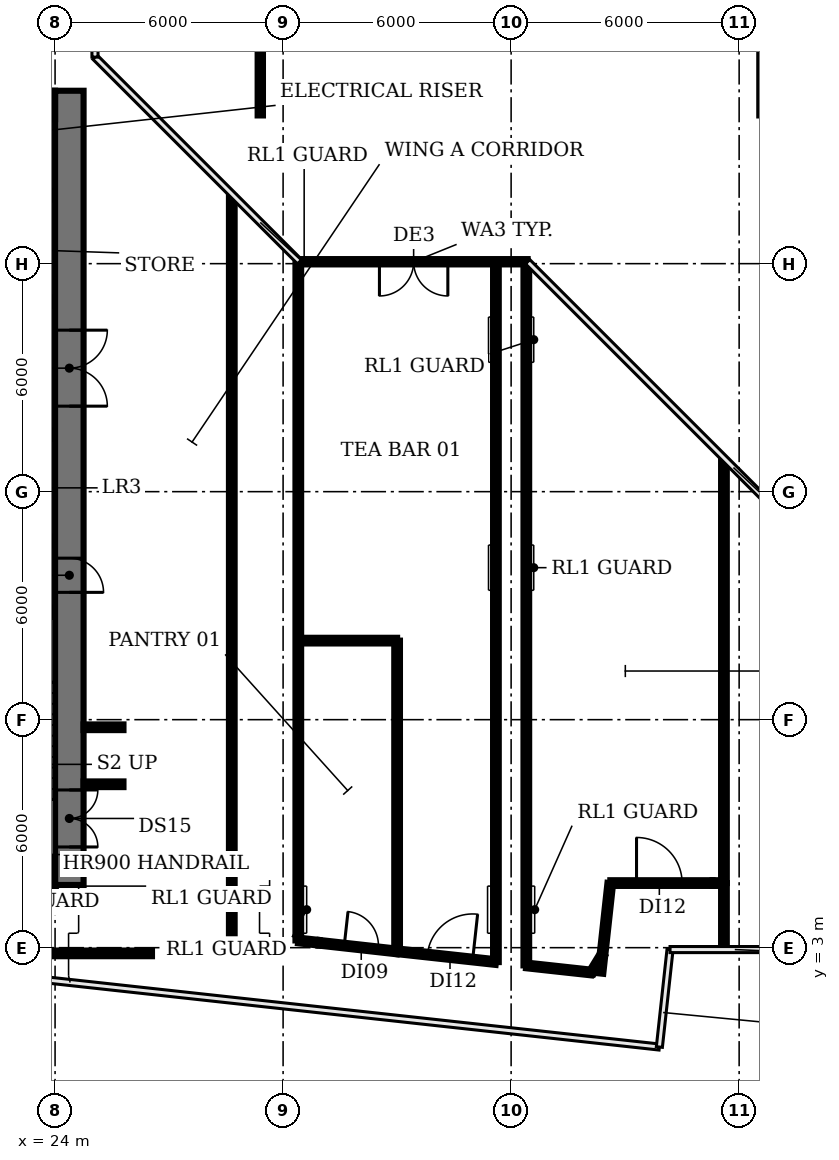
"""IFC4 building model, lengths in metres.
Left out: names, types, materials, properties, quantities, classifications, styles, units other than length and angle.
Written with IfcOpenShell. Run it as: python <this file> out.ifc"""

import sys

from ifc_helpers import new_model, si_unit, direction, frame, frame_2d, origin, place, context, subcontext, project, spatial, rectangle, extrude, element, fill, save


model = new_model("IFC4")
c1 = context("Model", 3, precision=1e-05, world=origin(), true_north=direction((0.0, 1.0)))
c2 = subcontext(c1, "Body", "Model", "MODEL_VIEW")
j1 = project(units=[si_unit("LENGTHUNIT", "METRE"), si_unit("PLANEANGLEUNIT", "RADIAN")], contexts=[c1])
p1 = place(None, origin())
s1 = spatial("IfcSite", under=j1, at=p1, CompositionType="ELEMENT")
p2 = place(p1, origin())
s2 = spatial("IfcBuilding", under=s1, at=p2, CompositionType="ELEMENT")
p3 = place(p2, frame((0.0, 0.0, 138.2)))
s3 = spatial("IfcBuildingStorey", under=s2, at=p3, CompositionType="ELEMENT", Elevation=138.2)
p4 = place(p3, frame((36.435, 21.05, 0.0), z_axis=(0.0, 0.0, 1.0), x_axis=(-1.0, 0.0, 0.0)))
e1 = element("IfcWall", 1, at=p4, inside=s3, PredefinedType="SOLIDWALL", context=c2, shape_type="SweptSolid", body=[
    extrude(rectangle(XDim=6.0, YDim=0.14, at=frame_2d((3.0, 0.0))), origin(), (0.0, 0.0, 1.0), 8.05),
])
p5 = place(p4, frame((2.1, 0.0, 0.0)))
e2 = element("IfcOpeningElement", 2, at=p5, cuts=e1, PredefinedType="OPENING", context=c2, shape_type="SweptSolid", body=[
    extrude(rectangle(XDim=1.8, YDim=2.4, at=frame_2d((0.9, 1.2))), frame((0.0, 0.08, 0.0), z_axis=(0.0, -1.0, 0.0), x_axis=(1.0, 0.0, 0.0)), (0.0, 0.0, 1.0), 0.16),
])
p6 = place(p3, frame((29.4, 24.9, 0.0), z_axis=(0.0, 0.0, 1.0), x_axis=(0.0, 1.0, 0.0)))
e3 = element("IfcWall", 3, at=p6, inside=s3, PredefinedType="SOLIDWALL", context=c2, shape_type="SweptSolid", body=[
    extrude(rectangle(XDim=3.7, YDim=0.14, at=frame_2d((1.85, 0.0))), origin(), (0.0, 0.0, 1.0), 8.05),
])
p7 = place(p3, frame((20.85, 11.825, 0.0), z_axis=(0.0, 0.0, 1.0), x_axis=(1.0, 0.0, 0.0)))
e4 = element("IfcWall", 4, at=p7, inside=s3, PredefinedType="SHEAR", context=c2, shape_type="SweptSolid", body=[
    extrude(rectangle(XDim=3.15, YDim=0.25, at=frame_2d((1.575, 0.0))), origin(), (0.0, 0.0, 1.0), 8.05),
])
p8 = place(p3, frame((16.6, 13.7, 0.0), z_axis=(0.0, 0.0, 1.0), x_axis=(1.0, 0.0, 0.0)))
e5 = element("IfcWall", 5, at=p8, inside=s3, PredefinedType="PARTITIONING", context=c2, shape_type="SweptSolid", body=[
    extrude(rectangle(XDim=7.4, YDim=0.225, at=frame_2d((3.7, 0.0))), origin(), (0.0, 0.0, 1.0), 8.05),
])
p9 = place(p3, frame((9.4, 16.5, 0.0), z_axis=(0.0, 0.0, 1.0), x_axis=(1.0, 0.0, 0.0)))
e6 = element("IfcWall", 6, at=p9, inside=s3, PredefinedType="PARTITIONING", context=c2, shape_type="SweptSolid", body=[
    extrude(rectangle(XDim=14.6, YDim=0.225, at=frame_2d((7.3, 0.0))), origin(), (0.0, 0.0, 1.0), 8.05),
])
p10 = place(p9, frame((0.75, 0.0, 0.0)))
e7 = element("IfcOpeningElement", 7, at=p10, cuts=e6, PredefinedType="OPENING", context=c2, shape_type="SweptSolid", body=[
    extrude(rectangle(XDim=1.1, YDim=2.1, at=frame_2d((0.55, 1.05))), frame((0.0, 0.123, 0.0), z_axis=(0.0, -1.0, 0.0), x_axis=(1.0, 0.0, 0.0)), (0.0, 0.0, 1.0), 0.245),
])
p11 = place(p9, frame((3.55, 0.0, 0.0)))
e8 = element("IfcOpeningElement", 8, at=p11, cuts=e6, PredefinedType="OPENING", context=c2, shape_type="SweptSolid", body=[
    extrude(rectangle(XDim=1.1, YDim=2.1, at=frame_2d((0.55, 1.05))), frame((0.0, 0.123, 0.0), z_axis=(0.0, -1.0, 0.0), x_axis=(1.0, 0.0, 0.0)), (0.0, 0.0, 1.0), 0.245),
])
p12 = place(p9, frame((6.35, 0.0, 0.0)))
e9 = element("IfcOpeningElement", 9, at=p12, cuts=e6, PredefinedType="OPENING", context=c2, shape_type="SweptSolid", body=[
    extrude(rectangle(XDim=1.1, YDim=2.1, at=frame_2d((0.55, 1.05))), frame((0.0, 0.123, 0.0), z_axis=(0.0, -1.0, 0.0), x_axis=(1.0, 0.0, 0.0)), (0.0, 0.0, 1.0), 0.245),
])
p13 = place(p9, frame((9.15, 0.0, 0.0)))
e10 = element("IfcOpeningElement", 10, at=p13, cuts=e6, PredefinedType="OPENING", context=c2, shape_type="SweptSolid", body=[
    extrude(rectangle(XDim=1.1, YDim=2.1, at=frame_2d((0.55, 1.05))), frame((0.0, 0.123, 0.0), z_axis=(0.0, -1.0, 0.0), x_axis=(1.0, 0.0, 0.0)), (0.0, 0.0, 1.0), 0.245),
])
p14 = place(p9, frame((12.4, 0.0, 0.0)))
e11 = element("IfcOpeningElement", 11, at=p14, cuts=e6, PredefinedType="OPENING", context=c2, shape_type="SweptSolid", body=[
    extrude(rectangle(XDim=1.0, YDim=2.1, at=frame_2d((0.5, 1.05))), frame((0.0, 0.123, 0.0), z_axis=(0.0, -1.0, 0.0), x_axis=(1.0, 0.0, 0.0)), (0.0, 0.0, 1.0), 0.245),
])
p15 = place(p3, frame((24.0, 20.0, 0.0), z_axis=(0.0, 0.0, 1.0), x_axis=(-1.0, 0.0, 0.0)))
e12 = element("IfcWall", 12, at=p15, inside=s3, PredefinedType="PARTITIONING", context=c2, shape_type="SweptSolid", body=[
    extrude(rectangle(XDim=14.6, YDim=0.225, at=frame_2d((7.3, 0.0))), origin(), (0.0, 0.0, 1.0), 8.05),
])
p16 = place(p15, frame((12.75, 0.0, 0.0)))
e13 = element("IfcOpeningElement", 13, at=p16, cuts=e12, PredefinedType="OPENING", context=c2, shape_type="SweptSolid", body=[
    extrude(rectangle(XDim=1.1, YDim=2.1, at=frame_2d((0.55, 1.05))), frame((0.0, 0.123, 0.0), z_axis=(0.0, -1.0, 0.0), x_axis=(1.0, 0.0, 0.0)), (0.0, 0.0, 1.0), 0.245),
])
p17 = place(p15, frame((9.95, 0.0, 0.0)))
e14 = element("IfcOpeningElement", 14, at=p17, cuts=e12, PredefinedType="OPENING", context=c2, shape_type="SweptSolid", body=[
    extrude(rectangle(XDim=1.1, YDim=2.1, at=frame_2d((0.55, 1.05))), frame((0.0, 0.123, 0.0), z_axis=(0.0, -1.0, 0.0), x_axis=(1.0, 0.0, 0.0)), (0.0, 0.0, 1.0), 0.245),
])
p18 = place(p15, frame((7.15, 0.0, 0.0)))
e15 = element("IfcOpeningElement", 15, at=p18, cuts=e12, PredefinedType="OPENING", context=c2, shape_type="SweptSolid", body=[
    extrude(rectangle(XDim=1.1, YDim=2.1, at=frame_2d((0.55, 1.05))), frame((0.0, 0.123, 0.0), z_axis=(0.0, -1.0, 0.0), x_axis=(1.0, 0.0, 0.0)), (0.0, 0.0, 1.0), 0.245),
])
p19 = place(p15, frame((4.35, 0.0, 0.0)))
e16 = element("IfcOpeningElement", 16, at=p19, cuts=e12, PredefinedType="OPENING", context=c2, shape_type="SweptSolid", body=[
    extrude(rectangle(XDim=1.1, YDim=2.1, at=frame_2d((0.55, 1.05))), frame((0.0, 0.123, 0.0), z_axis=(0.0, -1.0, 0.0), x_axis=(1.0, 0.0, 0.0)), (0.0, 0.0, 1.0), 0.245),
])
p20 = place(p15, frame((1.2, 0.0, 0.0)))
e17 = element("IfcOpeningElement", 17, at=p20, cuts=e12, PredefinedType="OPENING", context=c2, shape_type="SweptSolid", body=[
    extrude(rectangle(XDim=1.0, YDim=2.1, at=frame_2d((0.5, 1.05))), frame((0.0, 0.123, 0.0), z_axis=(0.0, -1.0, 0.0), x_axis=(1.0, 0.0, 0.0)), (0.0, 0.0, 1.0), 0.245),
])
p21 = place(p3, frame((9.4, 22.8, 0.0), z_axis=(0.0, 0.0, 1.0), x_axis=(1.0, 0.0, 0.0)))
e18 = element("IfcWall", 18, at=p21, inside=s3, PredefinedType="PARTITIONING", context=c2, shape_type="SweptSolid", body=[
    extrude(rectangle(XDim=14.6, YDim=0.225, at=frame_2d((7.3, 0.0))), origin(), (0.0, 0.0, 1.0), 8.05),
])
p22 = place(p3, frame((24.375, 25.55, 0.0), z_axis=(0.0, 0.0, 1.0), x_axis=(0.0, -1.0, 0.0)))
e19 = element("IfcWall", 19, at=p22, inside=s3, PredefinedType="SHEAR", context=c2, shape_type="SweptSolid", body=[
    extrude(rectangle(XDim=20.9, YDim=0.75, at=frame_2d((10.45, 0.0))), origin(), (0.0, 0.0, 1.0), 8.05),
])
p23 = place(p22, frame((18.4, 0.0, 0.0)))
e20 = element("IfcOpeningElement", 20, at=p23, cuts=e19, PredefinedType="OPENING", context=c2, shape_type="SweptSolid", body=[
    extrude(rectangle(XDim=1.5, YDim=2.1, at=frame_2d((0.75, 1.05))), frame((0.0, 0.385, 0.0), z_axis=(0.0, -1.0, 0.0), x_axis=(1.0, 0.0, 0.0)), (0.0, 0.0, 1.0), 0.77),
])
p24 = place(p22, frame((12.3, 0.0, 0.0)))
e21 = element("IfcOpeningElement", 21, at=p24, cuts=e19, PredefinedType="OPENING", context=c2, shape_type="SweptSolid", body=[
    extrude(rectangle(XDim=0.9, YDim=2.1, at=frame_2d((0.45, 1.05))), frame((0.0, 0.385, 0.0), z_axis=(0.0, -1.0, 0.0), x_axis=(1.0, 0.0, 0.0)), (0.0, 0.0, 1.0), 0.77),
])
p25 = place(p22, frame((6.3, 0.0, 0.0)))
e22 = element("IfcOpeningElement", 22, at=p25, cuts=e19, PredefinedType="OPENING", context=c2, shape_type="SweptSolid", body=[
    extrude(rectangle(XDim=2.0, YDim=2.1, at=frame_2d((1.0, 1.05))), frame((0.0, 0.385, 0.0), z_axis=(0.0, -1.0, 0.0), x_axis=(1.0, 0.0, 0.0)), (0.0, 0.0, 1.0), 0.77),
])
p26 = place(p3, frame((24.0, 5.025, 0.0), z_axis=(0.0, 0.0, 1.0), x_axis=(-1.0, 0.0, 0.0)))
e23 = element("IfcWall", 23, at=p26, inside=s3, PredefinedType="SHEAR", context=c2, shape_type="SweptSolid", body=[
    extrude(rectangle(XDim=18.0, YDim=0.75, at=frame_2d((9.0, 0.0))), origin(), (0.0, 0.0, 1.0), 8.05),
])
p27 = place(p26, frame((13.0, 0.0, 0.0)))
e24 = element("IfcOpeningElement", 24, at=p27, cuts=e23, PredefinedType="OPENING", context=c2, shape_type="SweptSolid", body=[
    extrude(rectangle(XDim=1.2, YDim=2.1, at=frame_2d((0.6, 1.05))), frame((0.0, 0.385, 0.0), z_axis=(0.0, -1.0, 0.0), x_axis=(1.0, 0.0, 0.0)), (0.0, 0.0, 1.0), 0.77),
])
p28 = place(p26, frame((3.85, 0.0, 0.0)))
e25 = element("IfcOpeningElement", 25, at=p28, cuts=e23, PredefinedType="OPENING", context=c2, shape_type="SweptSolid", body=[
    extrude(rectangle(XDim=1.0, YDim=2.1, at=frame_2d((0.5, 1.05))), frame((0.0, 0.385, 0.0), z_axis=(0.0, -1.0, 0.0), x_axis=(1.0, 0.0, 0.0)), (0.0, 0.0, 1.0), 0.77),
])
p29 = place(p3, frame((6.0, 25.175, 0.0), z_axis=(0.0, 0.0, 1.0), x_axis=(1.0, 0.0, 0.0)))
e26 = element("IfcWall", 26, at=p29, inside=s3, PredefinedType="SHEAR", context=c2, shape_type="SweptSolid", body=[
    extrude(rectangle(XDim=18.0, YDim=0.75, at=frame_2d((9.0, 0.0))), origin(), (0.0, 0.0, 1.0), 8.05),
])
p30 = place(p3, frame((17.949, 2.85, 0.0), z_axis=(0.0, 0.0, 1.0), x_axis=(1.0, 0.0, 0.0)))
e27 = element("IfcWall", 27, at=p30, inside=s3, PredefinedType="PARTITIONING", context=c2, shape_type="SweptSolid", body=[
    extrude(rectangle(XDim=8.601, YDim=0.15, at=frame_2d((4.301, 0.0))), origin(), (0.0, 0.0, 1.0), 6.33),
])
for number, where, z_axis, x_axis in (
    (28, (24.75, 7.3, 0.0), (0.0, 0.0, 1.0), (1.0, 0.0, 0.0)),
    (29, (24.75, 8.8, 0.0), (0.0, 0.0, 1.0), (1.0, 0.0, 0.0)),
):
    element("IfcWall", number, at=place(p3, frame(where, z_axis=z_axis, x_axis=x_axis)), inside=s3, PredefinedType="PARTITIONING", context=c2, shape_type="SweptSolid", body=[
        extrude(rectangle(XDim=1.05, YDim=0.15, at=frame_2d((0.525, 0.0))), origin(), (0.0, 0.0, 1.0), 6.33),
    ])
p31 = place(p3, frame((28.65, 3.38, 0.0), z_axis=(0.0, 0.0, 1.0), x_axis=(0.0, 1.0, 0.0)))
e30 = element("IfcWall", 30, at=p31, inside=s3, PredefinedType="PARTITIONING", context=c2, shape_type="SweptSolid", body=[
    extrude(rectangle(XDim=19.38, YDim=0.15, at=frame_2d((9.69, 0.0))), origin(), (0.0, 0.0, 1.0), 6.33),
])
p32 = place(p3, frame((30.4, 3.19, 0.0), z_axis=(0.0, 0.0, 1.0), x_axis=(0.0, 1.0, 0.0)))
e31 = element("IfcWall", 31, at=p32, inside=s3, PredefinedType="PARTITIONING", context=c2, shape_type="SweptSolid", body=[
    extrude(rectangle(XDim=17.796, YDim=0.15, at=frame_2d((8.898, 0.0))), origin(), (0.0, 0.0, 1.0), 6.33),
])
p33 = place(p3, frame((30.4, 3.19, 0.0), z_axis=(0.0, 0.0, 1.0), x_axis=(0.993845851809, -0.110771940683, 0.0)))
e32 = element("IfcWall", 32, at=p33, inside=s3, PredefinedType="PARTITIONING", context=c2, shape_type="SweptSolid", body=[
    extrude(rectangle(XDim=0.551, YDim=0.15, at=frame_2d((0.275, 0.0))), origin(), (0.0, 0.0, 1.0), 6.33),
])
p34 = place(p3, frame((30.4, 11.08, 0.0), z_axis=(0.0, 0.0, 1.0), x_axis=(1.0, 0.0, 0.0)))
e33 = element("IfcWall", 33, at=p34, inside=s3, PredefinedType="PARTITIONING", context=c2, shape_type="SweptSolid", body=[
    extrude(rectangle(XDim=2.6, YDim=0.15, at=frame_2d((1.3, 0.0))), origin(), (0.0, 0.0, 1.0), 6.33),
])
p35 = place(p3, frame((30.948, 3.129, 0.0), z_axis=(0.0, 0.0, 1.0), x_axis=(0.993833173322, -0.110885632993, 0.0)))
e34 = element("IfcWall", 34, at=p35, inside=s3, PredefinedType="PARTITIONING", context=c2, shape_type="SweptSolid", body=[
    extrude(rectangle(XDim=2.065, YDim=0.15, at=frame_2d((1.033, 0.0))), origin(), (0.0, 0.0, 1.0), 6.33),
])
p36 = place(p35, frame((0.665, 0.0, 0.0)))
e35 = element("IfcOpeningElement", 35, at=p36, cuts=e34, PredefinedType="OPENING", context=c2, shape_type="SweptSolid", body=[
    extrude(rectangle(XDim=0.9, YDim=2.1, at=frame_2d((0.45, 1.05))), frame((0.0, 0.085, 0.0), z_axis=(0.0, -1.0, 0.0), x_axis=(1.0, 0.0, 0.0)), (0.0, 0.0, 1.0), 0.17),
])
p37 = place(p3, frame((33.0, 2.905, 0.0), z_axis=(0.0, 0.0, 1.0), x_axis=(0.0, 1.0, 0.0)))
e36 = element("IfcWall", 36, at=p37, inside=s3, PredefinedType="PARTITIONING", context=c2, shape_type="SweptSolid", body=[
    extrude(rectangle(XDim=8.176, YDim=0.15, at=frame_2d((4.088, 0.0))), origin(), (0.0, 0.0, 1.0), 6.33),
])
p38 = place(p3, frame((33.0, 2.905, 0.0), z_axis=(0.0, 0.0, 1.0), x_axis=(0.994090278012, -0.108556525195, 0.0)))
e37 = element("IfcWall", 37, at=p38, inside=s3, PredefinedType="PARTITIONING", context=c2, shape_type="SweptSolid", body=[
    extrude(rectangle(XDim=2.615, YDim=0.15, at=frame_2d((1.308, 0.0))), origin(), (0.0, 0.0, 1.0), 6.33),
])
p39 = place(p38, frame((0.8, 0.0, 0.0)))
e38 = element("IfcOpeningElement", 38, at=p39, cuts=e37, PredefinedType="OPENING", context=c2, shape_type="SweptSolid", body=[
    extrude(rectangle(XDim=1.2, YDim=2.1, at=frame_2d((0.6, 1.05))), frame((0.0, 0.085, 0.0), z_axis=(0.0, -1.0, 0.0), x_axis=(1.0, 0.0, 0.0)), (0.0, 0.0, 1.0), 0.17),
])
p40 = place(p3, frame((35.6, 2.621, 0.0), z_axis=(0.0, 0.0, 1.0), x_axis=(0.0, 1.0, 0.0)))
e39 = element("IfcWall", 39, at=p40, inside=s3, PredefinedType="PARTITIONING", context=c2, shape_type="SweptSolid", body=[
    extrude(rectangle(XDim=18.379, YDim=0.15, at=frame_2d((9.19, 0.0))), origin(), (0.0, 0.0, 1.0), 6.33),
])
p41 = place(p3, frame((36.4, 2.533, 0.0), z_axis=(0.0, 0.0, 1.0), x_axis=(0.0, 1.0, 0.0)))
e40 = element("IfcWall", 40, at=p41, inside=s3, PredefinedType="PARTITIONING", context=c2, shape_type="SweptSolid", body=[
    extrude(rectangle(XDim=18.411, YDim=0.15, at=frame_2d((9.205, 0.0))), origin(), (0.0, 0.0, 1.0), 6.33),
])
p42 = place(p3, frame((36.4, 2.533, 0.0), z_axis=(0.0, 0.0, 1.0), x_axis=(0.99406714658, -0.108768139133, 0.0)))
e41 = element("IfcWall", 41, at=p42, inside=s3, PredefinedType="PARTITIONING", context=c2, shape_type="SweptSolid", body=[
    extrude(rectangle(XDim=1.724, YDim=0.15, at=frame_2d((0.862, 0.0))), origin(), (0.0, 0.0, 1.0), 6.33),
])
p43 = place(p3, frame((38.114, 2.346, 0.0), z_axis=(0.0, 0.0, 1.0), x_axis=(0.522069410568, 0.852903001841, 0.0)))
e42 = element("IfcWall", 42, at=p43, inside=s3, PredefinedType="PARTITIONING", context=c2, shape_type="SweptSolid", body=[
    extrude(rectangle(XDim=0.558, YDim=0.15, at=frame_2d((0.279, 0.0))), origin(), (0.0, 0.0, 1.0), 6.33),
])
p44 = place(p3, frame((38.35, 2.32, 0.0), z_axis=(0.0, 0.0, 1.0), x_axis=(0.108606922801, 0.994084773206, 0.0)))
e43 = element("IfcWall", 43, at=p44, inside=s3, PredefinedType="PARTITIONING", context=c2, shape_type="SweptSolid", body=[
    extrude(rectangle(XDim=2.394, YDim=0.15, at=frame_2d((1.197, 0.0))), origin(), (0.0, 0.0, 1.0), 6.33),
])
p45 = place(p3, frame((38.61, 4.7, 0.0), z_axis=(0.0, 0.0, 1.0), x_axis=(1.0, 0.0, 0.0)))
e44 = element("IfcWall", 44, at=p45, inside=s3, PredefinedType="PARTITIONING", context=c2, shape_type="SweptSolid", body=[
    extrude(rectangle(XDim=2.69, YDim=0.15, at=frame_2d((1.345, 0.0))), origin(), (0.0, 0.0, 1.0), 6.33),
])
p46 = place(p45, frame((0.69, 0.0, 0.0)))
e45 = element("IfcOpeningElement", 45, at=p46, cuts=e44, PredefinedType="OPENING", context=c2, shape_type="SweptSolid", body=[
    extrude(rectangle(XDim=1.2, YDim=2.1, at=frame_2d((0.6, 1.05))), frame((0.0, 0.085, 0.0), z_axis=(0.0, -1.0, 0.0), x_axis=(1.0, 0.0, 0.0)), (0.0, 0.0, 1.0), 0.17),
])
p47 = place(p3, frame((41.3, 4.7, 0.0), z_axis=(0.0, 0.0, 1.0), x_axis=(1.0, 0.0, 0.0)))
e46 = element("IfcWall", 46, at=p47, inside=s3, PredefinedType="PARTITIONING", context=c2, shape_type="SweptSolid", body=[
    extrude(rectangle(XDim=0.3, YDim=0.15, at=frame_2d((0.15, 0.0))), origin(), (0.0, 0.0, 1.0), 6.33),
])
p48 = place(p3, frame((41.6, 3.0, 0.0), z_axis=(0.0, 0.0, 1.0), x_axis=(0.0, 1.0, 0.0)))
e47 = element("IfcWall", 47, at=p48, inside=s3, PredefinedType="PARTITIONING", context=c2, shape_type="SweptSolid", body=[
    extrude(rectangle(XDim=1.7, YDim=0.15, at=frame_2d((0.85, 0.0))), origin(), (0.0, 0.0, 1.0), 6.33),
])
p49 = place(p3, frame((41.6, 4.7, 0.0), z_axis=(0.0, 0.0, 1.0), x_axis=(0.0, 1.0, 0.0)))
e48 = element("IfcWall", 48, at=p49, inside=s3, PredefinedType="PARTITIONING", context=c2, shape_type="SweptSolid", body=[
    extrude(rectangle(XDim=11.11, YDim=0.15, at=frame_2d((5.555, 0.0))), origin(), (0.0, 0.0, 1.0), 6.33),
])
p50 = place(p5, origin())
e49 = element("IfcDoor", 49, at=p50, inside=s3, OperationType="DOUBLE_DOOR_DOUBLE_SWING", PredefinedType="DOOR", context=c2, shape_type="SweptSolid", body=[
    extrude(rectangle(XDim=1.8, YDim=2.4, at=frame_2d((0.9, 1.2))), frame((0.0, 0.025, 0.0), z_axis=(0.0, -1.0, 0.0), x_axis=(1.0, 0.0, 0.0)), (0.0, 0.0, 1.0), 0.05),
])
fill(e2, e49)
p51 = place(p23, origin())
e50 = element("IfcDoor", 50, at=p51, inside=s3, OperationType="DOUBLE_DOOR_SINGLE_SWING", PredefinedType="DOOR", context=c2, shape_type="SweptSolid", body=[
    extrude(rectangle(XDim=1.5, YDim=2.1, at=frame_2d((0.75, 1.05))), frame((0.0, 0.025, 0.0), z_axis=(0.0, -1.0, 0.0), x_axis=(1.0, 0.0, 0.0)), (0.0, 0.0, 1.0), 0.05),
])
fill(e20, e50)
p52 = place(p24, origin())
e51 = element("IfcDoor", 51, at=p52, inside=s3, OperationType="SINGLE_SWING_RIGHT", PredefinedType="DOOR", context=c2, shape_type="SweptSolid", body=[
    extrude(rectangle(XDim=0.9, YDim=2.1, at=frame_2d((0.45, 1.05))), frame((0.0, -0.315, 0.0), z_axis=(0.0, -1.0, 0.0), x_axis=(1.0, 0.0, 0.0)), (0.0, 0.0, 1.0), 0.05),
])
fill(e21, e51)
p53 = place(p25, origin())
e52 = element("IfcDoor", 52, at=p53, inside=s3, OperationType="DOUBLE_DOOR_SINGLE_SWING", PredefinedType="DOOR", context=c2, shape_type="SweptSolid", body=[
    extrude(rectangle(XDim=2.0, YDim=2.1, at=frame_2d((1.0, 1.05))), frame((0.0, 0.025, 0.0), z_axis=(0.0, -1.0, 0.0), x_axis=(1.0, 0.0, 0.0)), (0.0, 0.0, 1.0), 0.05),
])
fill(e22, e52)
p54 = place(p36, origin())
e53 = element("IfcDoor", 53, at=p54, inside=s3, OperationType="SINGLE_SWING_LEFT", PredefinedType="DOOR", context=c2, shape_type="SweptSolid", body=[
    extrude(rectangle(XDim=0.9, YDim=2.1, at=frame_2d((0.45, 1.05))), frame((0.0, 0.025, 0.0), z_axis=(0.0, -1.0, 0.0), x_axis=(1.0, 0.0, 0.0)), (0.0, 0.0, 1.0), 0.05),
])
fill(e35, e53)
p55 = place(p39, origin())
e54 = element("IfcDoor", 54, at=p55, inside=s3, OperationType="SINGLE_SWING_RIGHT", PredefinedType="DOOR", context=c2, shape_type="SweptSolid", body=[
    extrude(rectangle(XDim=1.2, YDim=2.1, at=frame_2d((0.6, 1.05))), frame((0.0, 0.025, 0.0), z_axis=(0.0, -1.0, 0.0), x_axis=(1.0, 0.0, 0.0)), (0.0, 0.0, 1.0), 0.05),
])
fill(e38, e54)
p56 = place(p46, origin())
e55 = element("IfcDoor", 55, at=p56, inside=s3, OperationType="SINGLE_SWING_LEFT", PredefinedType="DOOR", context=c2, shape_type="SweptSolid", body=[
    extrude(rectangle(XDim=1.2, YDim=2.1, at=frame_2d((0.6, 1.05))), frame((0.0, 0.025, 0.0), z_axis=(0.0, -1.0, 0.0), x_axis=(1.0, 0.0, 0.0)), (0.0, 0.0, 1.0), 0.05),
])
fill(e45, e55)
save(model, sys.argv[1])
